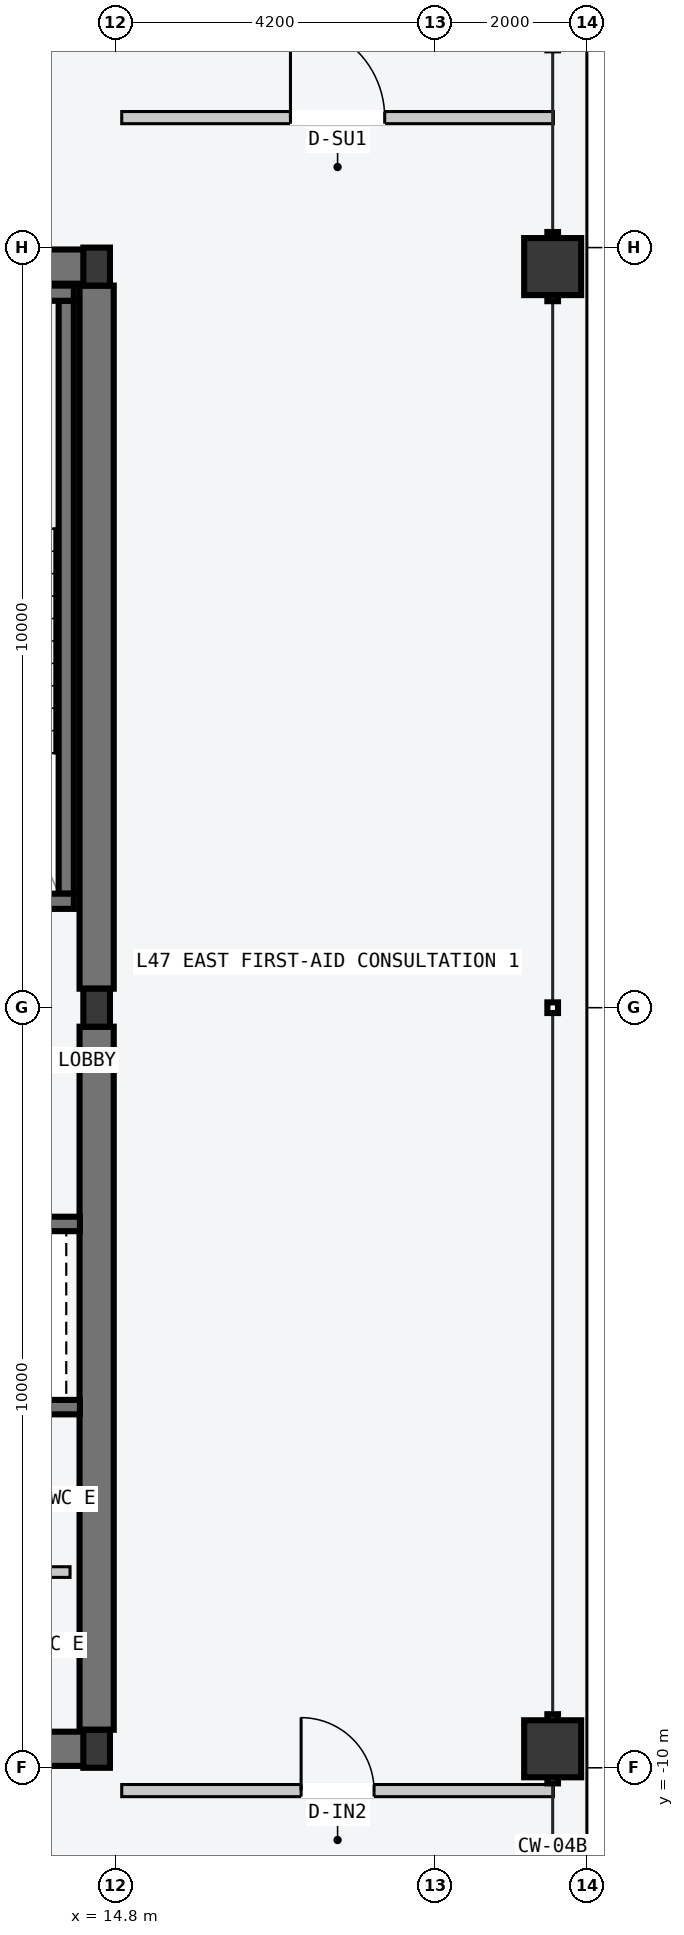
"""IFC4 building model, lengths in metres.
Left out: names, types, materials, properties, quantities, classifications, styles, units other than length and angle.
Written with IfcOpenShell. Run it as: python <this file> out.ifc"""

import sys

from ifc_helpers import new_model, si_unit, direction, frame, frame_2d, origin, origin_2d, place, context, subcontext, project, spatial, rectangle, hollow_rectangle, i_section, extrude, element, fill, save


model = new_model("IFC4")
c1 = context("Model", 3, precision=1e-05, world=origin(), true_north=direction((0.0, 1.0)))
c2 = subcontext(c1, "Body", "Model", "MODEL_VIEW")
j1 = project(units=[si_unit("LENGTHUNIT", "METRE"), si_unit("PLANEANGLEUNIT", "RADIAN")], contexts=[c1])
p1 = place(None, origin())
s1 = spatial("IfcSite", under=j1, at=p1, CompositionType="ELEMENT")
p2 = place(p1, origin())
s2 = spatial("IfcBuilding", under=s1, at=p2, CompositionType="ELEMENT")
p3 = place(p2, frame((0.0, 0.0, 180.3)))
s3 = spatial("IfcBuildingStorey", under=s2, at=p3, CompositionType="ELEMENT", Elevation=180.3)
for number, where, z_axis, x_axis in (
    (1, (8.07, -9.75, -0.2), (0.0, 0.0, 1.0), (1.0, 0.0, 0.0)),
    (2, (8.07, 9.75, -0.2), (0.0, 0.0, 1.0), (1.0, 0.0, 0.0)),
):
    element("IfcWall", number, at=place(p3, frame(where, z_axis=z_axis, x_axis=x_axis)), inside=s3, PredefinedType="SHEAR", context=c2, shape_type="SweptSolid", body=[
        extrude(rectangle(XDim=6.46, YDim=0.45, at=frame_2d((3.23, 0.0))), origin(), (0.0, 0.0, 1.0), 3.6),
    ])
for number, where, z_axis, x_axis in (
    (3, (14.55, -9.5, -0.2), (0.0, 0.0, 1.0), (0.0, 1.0, 0.0)),
    (4, (14.55, 0.25, -0.2), (0.0, 0.0, 1.0), (0.0, 1.0, 0.0)),
):
    element("IfcWall", number, at=place(p3, frame(where, z_axis=z_axis, x_axis=x_axis)), inside=s3, PredefinedType="SHEAR", context=c2, shape_type="SweptSolid", body=[
        extrude(rectangle(XDim=9.25, YDim=0.45, at=frame_2d((4.625, 0.0))), origin(), (0.0, 0.0, 1.0), 3.6),
    ])
p4 = place(p3, frame((14.15, 1.5, -0.2), z_axis=(0.0, 0.0, 1.0), x_axis=(0.0, 1.0, 0.0)))
e5 = element("IfcWall", 5, at=p4, inside=s3, PredefinedType="SOLIDWALL", context=c2, shape_type="SweptSolid", body=[
    extrude(rectangle(XDim=7.8, YDim=0.2, at=frame_2d((3.9, 0.0))), origin(), (0.0, 0.0, 1.0), 3.6),
])
p5 = place(p3, frame((10.53, 1.4, -0.2), z_axis=(0.0, 0.0, 1.0), x_axis=(1.0, 0.0, 0.0)))
e6 = element("IfcWall", 6, at=p5, inside=s3, PredefinedType="SOLIDWALL", context=c2, shape_type="SweptSolid", body=[
    extrude(rectangle(XDim=3.72, YDim=0.2, at=frame_2d((1.86, 0.0))), origin(), (0.0, 0.0, 1.0), 3.6),
])
p6 = place(p5, frame((1.5, 0.0, 0.2)))
e7 = element("IfcOpeningElement", 7, at=p6, cuts=e6, PredefinedType="OPENING", context=c2, shape_type="SweptSolid", body=[
    extrude(rectangle(XDim=1.12, YDim=2.18, at=frame_2d((0.56, 1.09))), frame((0.0, 0.11, 0.0), z_axis=(0.0, -1.0, 0.0), x_axis=(1.0, 0.0, 0.0)), (0.0, 0.0, 1.0), 0.22),
])
p7 = place(p3, frame((10.53, 9.4, -0.2), z_axis=(0.0, 0.0, 1.0), x_axis=(1.0, 0.0, 0.0)))
e8 = element("IfcWall", 8, at=p7, inside=s3, PredefinedType="SOLIDWALL", context=c2, shape_type="SweptSolid", body=[
    extrude(rectangle(XDim=3.72, YDim=0.2, at=frame_2d((1.86, 0.0))), origin(), (0.0, 0.0, 1.0), 3.6),
])
for number, where, z_axis, x_axis in (
    (9, (14.55, -9.75, 0.0), (0.0, 0.0, 1.0), (1.0, 0.0, 0.0)),
    (10, (14.55, 0.0, 0.0), (0.0, 0.0, 1.0), (1.0, 0.0, 0.0)),
    (11, (14.55, 9.75, 0.0), (0.0, 0.0, 1.0), (1.0, 0.0, 0.0)),
):
    element("IfcColumn", number, at=place(p3, frame(where, z_axis=z_axis, x_axis=x_axis)), inside=s3, PredefinedType="COLUMN", context=c2, shape_type="SweptSolid", body=[
        extrude(i_section(OverallWidth=0.35, OverallDepth=0.5, WebThickness=0.02, FlangeThickness=0.032, at=origin_2d()), origin(), (0.0, 0.0, 1.0), 3.6),
    ])
for number, where, z_axis, x_axis in (
    (12, (20.55, -9.75, 0.0), (0.0, 0.0, 1.0), (0.0, 1.0, 0.0)),
    (13, (20.55, 9.75, 0.0), (0.0, 0.0, 1.0), (0.0, 1.0, 0.0)),
):
    element("IfcColumn", number, at=place(p3, frame(where, z_axis=z_axis, x_axis=x_axis)), inside=s3, PredefinedType="COLUMN", context=c2, shape_type="SweptSolid", body=[
        extrude(hollow_rectangle(XDim=0.75, YDim=0.75, WallThickness=0.032, at=origin_2d()), origin(), (0.0, 0.0, 1.0), 3.6),
    ])
p8 = place(p3, frame((11.65, -2.845, -0.2), z_axis=(0.0, 0.0, 1.0), x_axis=(1.0, 0.0, 0.0)))
e14 = element("IfcWall", 14, at=p8, inside=s3, PredefinedType="SOLIDWALL", context=c2, shape_type="SweptSolid", body=[
    extrude(rectangle(XDim=2.68, YDim=0.19, at=frame_2d((1.34, 0.0))), origin(), (0.0, 0.0, 1.0), 3.6),
])
p9 = place(p8, frame((0.65, 0.0, 0.2)))
e15 = element("IfcOpeningElement", 15, at=p9, cuts=e14, PredefinedType="OPENING", context=c2, shape_type="SweptSolid", body=[
    extrude(rectangle(XDim=1.2, YDim=2.2, at=frame_2d((0.6, 1.1))), frame((0.0, 0.105, 0.0), z_axis=(0.0, -1.0, 0.0), x_axis=(1.0, 0.0, 0.0)), (0.0, 0.0, 1.0), 0.21),
])
p10 = place(p3, frame((11.65, -5.255, -0.2), z_axis=(0.0, 0.0, 1.0), x_axis=(1.0, 0.0, 0.0)))
e16 = element("IfcWall", 16, at=p10, inside=s3, PredefinedType="SOLIDWALL", context=c2, shape_type="SweptSolid", body=[
    extrude(rectangle(XDim=2.68, YDim=0.19, at=frame_2d((1.34, 0.0))), origin(), (0.0, 0.0, 1.0), 3.6),
])
p11 = place(p3, frame((11.7, -7.425, 0.0), z_axis=(0.0, 0.0, 1.0), x_axis=(1.0, 0.0, 0.0)))
e17 = element("IfcWall", 17, at=p11, inside=s3, PredefinedType="PARTITIONING", context=c2, shape_type="SweptSolid", body=[
    extrude(rectangle(XDim=2.5, YDim=0.14, at=frame_2d((1.25, 0.0))), origin(), (0.0, 0.0, 1.0), 3.4),
])
p12 = place(p3, frame((14.88, 11.71, 0.0), z_axis=(0.0, 0.0, 1.0), x_axis=(1.0, 0.0, 0.0)))
e18 = element("IfcWall", 18, at=p12, inside=s3, PredefinedType="PARTITIONING", context=c2, shape_type="SweptSolid", body=[
    extrude(rectangle(XDim=5.68, YDim=0.16, at=frame_2d((2.84, 0.0))), origin(), (0.0, 0.0, 1.0), 3.4),
])
p13 = place(p12, frame((2.22, 0.0, 0.0)))
e19 = element("IfcOpeningElement", 19, at=p13, cuts=e18, PredefinedType="OPENING", context=c2, shape_type="SweptSolid", body=[
    extrude(rectangle(XDim=1.24, YDim=2.24, at=frame_2d((0.62, 1.12))), frame((0.0, 0.09, 0.0), z_axis=(0.0, -1.0, 0.0), x_axis=(1.0, 0.0, 0.0)), (0.0, 0.0, 1.0), 0.18),
])
p14 = place(p3, frame((14.88, -10.3, 0.0), z_axis=(0.0, 0.0, 1.0), x_axis=(1.0, 0.0, 0.0)))
e20 = element("IfcWall", 20, at=p14, inside=s3, PredefinedType="PARTITIONING", context=c2, shape_type="SweptSolid", body=[
    extrude(rectangle(XDim=5.68, YDim=0.16, at=frame_2d((2.84, 0.0))), origin(), (0.0, 0.0, 1.0), 3.4),
])
p15 = place(p14, frame((2.36, 0.0, 0.0)))
e21 = element("IfcOpeningElement", 21, at=p15, cuts=e20, PredefinedType="OPENING", context=c2, shape_type="SweptSolid", body=[
    extrude(rectangle(XDim=0.96, YDim=2.18, at=frame_2d((0.48, 1.09))), frame((0.0, 0.09, 0.0), z_axis=(0.0, -1.0, 0.0), x_axis=(1.0, 0.0, 0.0)), (0.0, 0.0, 1.0), 0.18),
])
p16 = place(p13, origin())
e22 = element("IfcDoor", 22, at=p16, inside=s3, OperationType="SINGLE_SWING_LEFT", PredefinedType="DOOR", context=c2, shape_type="SweptSolid", body=[
    extrude(rectangle(XDim=1.24, YDim=2.24, at=frame_2d((0.62, 1.12))), frame((0.0, 0.025, 0.0), z_axis=(0.0, -1.0, 0.0), x_axis=(1.0, 0.0, 0.0)), (0.0, 0.0, 1.0), 0.05),
])
fill(e19, e22)
p17 = place(p15, origin())
e23 = element("IfcDoor", 23, at=p17, inside=s3, OperationType="SINGLE_SWING_LEFT", PredefinedType="DOOR", context=c2, shape_type="SweptSolid", body=[
    extrude(rectangle(XDim=0.96, YDim=2.18, at=frame_2d((0.48, 1.09))), frame((0.0, 0.025, 0.0), z_axis=(0.0, -1.0, 0.0), x_axis=(1.0, 0.0, 0.0)), (0.0, 0.0, 1.0), 0.05),
])
fill(e21, e23)
save(model, sys.argv[1])
